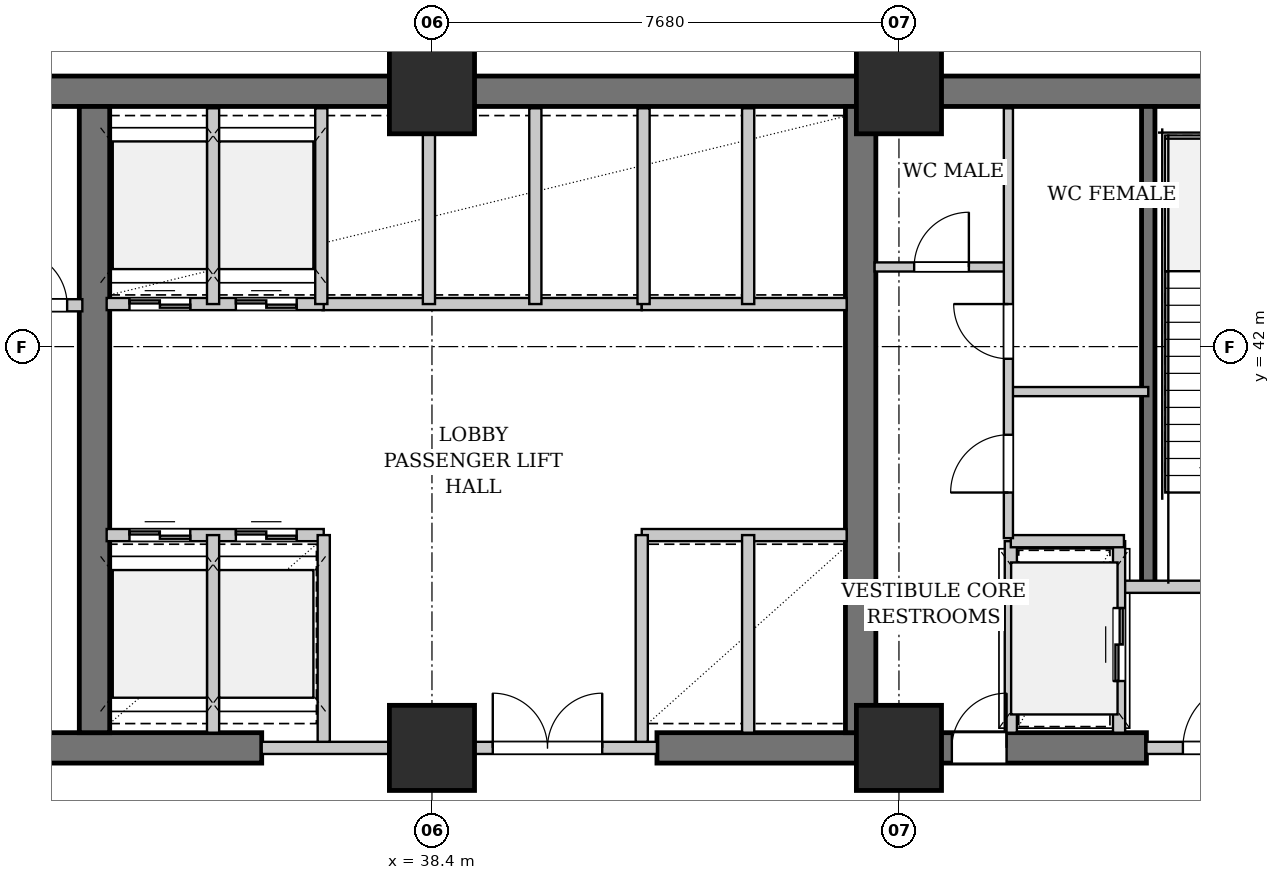
"""IFC4 building model, lengths in metres.
Left out: names, types, materials, properties, quantities, classifications, styles, units other than length and angle.
Written with IfcOpenShell. Run it as: python <this file> out.ifc"""

import sys

from ifc_helpers import new_model, si_unit, direction, frame, frame_2d, origin, origin_2d, place, context, subcontext, project, spatial, rectangle, extrude, element, fill, save


model = new_model("IFC4")
c1 = context("Model", 3, precision=1e-05, world=origin(), true_north=direction((0.0, 1.0)))
c2 = subcontext(c1, "Body", "Model", "MODEL_VIEW")
j1 = project(units=[si_unit("LENGTHUNIT", "METRE"), si_unit("PLANEANGLEUNIT", "RADIAN")], contexts=[c1])
p1 = place(None, origin())
s1 = spatial("IfcSite", under=j1, at=p1, CompositionType="ELEMENT")
p2 = place(p1, origin())
s2 = spatial("IfcBuilding", under=s1, at=p2, CompositionType="ELEMENT")
p3 = place(p2, frame((0.0, 0.0, 20.4)))
s3 = spatial("IfcBuildingStorey", under=s2, at=p3, CompositionType="ELEMENT", Elevation=20.4)
p4 = place(p3, frame((22.79, 46.2, 0.0), z_axis=(0.0, 0.0, 1.0), x_axis=(1.0, 0.0, 0.0)))
e1 = element("IfcWall", 1, at=p4, inside=s3, PredefinedType="SHEAR", context=c2, shape_type="SweptSolid", body=[
    extrude(rectangle(XDim=31.22, YDim=0.5, at=frame_2d((15.61, 0.0))), origin(), (0.0, 0.0, 1.0), 4.38),
])
p5 = place(p3, frame((30.72, 35.4, 0.0), z_axis=(0.0, 0.0, 1.0), x_axis=(1.0, 0.0, 0.0)))
e2 = element("IfcWall", 2, at=p5, inside=s3, PredefinedType="SHEAR", context=c2, shape_type="SweptSolid", body=[
    extrude(rectangle(XDim=4.88, YDim=0.5, at=frame_2d((2.44, 0.0))), origin(), (0.0, 0.0, 1.0), 4.38),
])
p6 = place(p3, frame((42.1, 35.4, 0.0), z_axis=(0.0, 0.0, 1.0), x_axis=(1.0, 0.0, 0.0)))
e3 = element("IfcWall", 3, at=p6, inside=s3, PredefinedType="SHEAR", context=c2, shape_type="SweptSolid", body=[
    extrude(rectangle(XDim=8.05, YDim=0.5, at=frame_2d((4.025, 0.0))), origin(), (0.0, 0.0, 1.0), 4.38),
])
p7 = place(p6, frame((4.85, 0.0, 0.0)))
e4 = element("IfcOpeningElement", 4, at=p7, cuts=e3, PredefinedType="OPENING", context=c2, shape_type="SweptSolid", body=[
    extrude(rectangle(XDim=0.9, YDim=2.15, at=frame_2d((0.45, 1.075))), frame((0.0, 0.26, 0.0), z_axis=(0.0, -1.0, 0.0), x_axis=(1.0, 0.0, 0.0)), (0.0, 0.0, 1.0), 0.52),
])
for number, where, z_axis, x_axis in (
    (5, (32.85, 35.65, 0.0), (0.0, 0.0, 1.0), (0.0, 1.0, 0.0)),
    (6, (45.45, 35.65, 0.0), (0.0, 0.0, 1.0), (0.0, 1.0, 0.0)),
):
    element("IfcWall", number, at=place(p3, frame(where, z_axis=z_axis, x_axis=x_axis)), inside=s3, PredefinedType="SHEAR", context=c2, shape_type="SweptSolid", body=[
        extrude(rectangle(XDim=10.3, YDim=0.5, at=frame_2d((5.15, 0.0))), origin(), (0.0, 0.0, 1.0), 4.38),
    ])
p8 = place(p3, frame((50.18, 38.05, 0.0), z_axis=(0.0, 0.0, 1.0), x_axis=(0.0, 1.0, 0.0)))
e7 = element("IfcWall", 7, at=p8, inside=s3, PredefinedType="SHEAR", context=c2, shape_type="SweptSolid", body=[
    extrude(rectangle(XDim=7.9, YDim=0.22, at=frame_2d((3.95, 0.0))), origin(), (0.0, 0.0, 1.0), 4.38),
])
for number, where, z_axis, x_axis in (
    (8, (38.4, 35.4, 0.0), (0.0, 0.0, 1.0), (1.0, 0.0, 0.0)),
    (9, (38.4, 46.2, 0.0), (0.0, 0.0, 1.0), (1.0, 0.0, 0.0)),
    (10, (46.08, 35.4, 0.0), (0.0, 0.0, 1.0), (1.0, 0.0, 0.0)),
    (11, (46.08, 46.2, 0.0), (0.0, 0.0, 1.0), (1.0, 0.0, 0.0)),
):
    element("IfcColumn", number, at=place(p3, frame(where, z_axis=z_axis, x_axis=x_axis)), inside=s3, PredefinedType="COLUMN", context=c2, shape_type="SweptSolid", body=[
        extrude(rectangle(XDim=1.4, YDim=1.4, at=origin_2d()), origin(), (0.0, 0.0, 1.0), 4.8),
    ])
p9 = place(p3, frame((27.32, 42.68, 0.0), z_axis=(0.0, 0.0, 1.0), x_axis=(1.0, 0.0, 0.0)))
e12 = element("IfcWall", 12, at=p9, inside=s3, PredefinedType="PARTITIONING", context=c2, shape_type="SweptSolid", body=[
    extrude(rectangle(XDim=5.33, YDim=0.2, at=frame_2d((2.665, 0.0))), origin(), (0.0, 0.0, 1.0), 4.38),
])
p10 = place(p9, frame((4.18, 0.0, 0.0)))
e13 = element("IfcOpeningElement", 13, at=p10, cuts=e12, PredefinedType="OPENING", context=c2, shape_type="SweptSolid", body=[
    extrude(rectangle(XDim=0.9, YDim=2.15, at=frame_2d((0.45, 1.075))), frame((0.0, 0.11, 0.0), z_axis=(0.0, -1.0, 0.0), x_axis=(1.0, 0.0, 0.0)), (0.0, 0.0, 1.0), 0.22),
])
p11 = place(p3, frame((35.6, 35.4, 0.0), z_axis=(0.0, 0.0, 1.0), x_axis=(1.0, 0.0, 0.0)))
e14 = element("IfcWall", 14, at=p11, inside=s3, PredefinedType="PARTITIONING", context=c2, shape_type="SweptSolid", body=[
    extrude(rectangle(XDim=6.5, YDim=0.2, at=frame_2d((3.25, 0.0))), origin(), (0.0, 0.0, 1.0), 3.575),
])
p12 = place(p11, frame((3.8, 0.0, 0.0)))
e15 = element("IfcOpeningElement", 15, at=p12, cuts=e14, PredefinedType="OPENING", context=c2, shape_type="SweptSolid", body=[
    extrude(rectangle(XDim=1.8, YDim=2.3, at=frame_2d((0.9, 1.15))), frame((0.0, 0.11, 0.0), z_axis=(0.0, -1.0, 0.0), x_axis=(1.0, 0.0, 0.0)), (0.0, 0.0, 1.0), 0.22),
])
p13 = place(p3, frame((36.6, 42.7, 0.0), z_axis=(0.0, 0.0, 1.0), x_axis=(1.0, 0.0, 0.0)))
e16 = element("IfcWall", 16, at=p13, inside=s3, PredefinedType="PARTITIONING", context=c2, shape_type="SweptSolid", body=[
    extrude(rectangle(XDim=5.25, YDim=0.2, at=frame_2d((2.625, 0.0))), origin(), (0.0, 0.0, 1.0), 4.38),
])
p14 = place(p3, frame((38.35, 42.7, 0.0), z_axis=(0.0, 0.0, 1.0), x_axis=(0.0, 1.0, 0.0)))
e17 = element("IfcWall", 17, at=p14, inside=s3, PredefinedType="PARTITIONING", context=c2, shape_type="SweptSolid", body=[
    extrude(rectangle(XDim=3.22, YDim=0.2, at=frame_2d((1.61, 0.0))), origin(), (0.0, 0.0, 1.0), 3.575),
])
p15 = place(p3, frame((40.1, 42.7, 0.0), z_axis=(0.0, 0.0, 1.0), x_axis=(0.0, 1.0, 0.0)))
e18 = element("IfcWall", 18, at=p15, inside=s3, PredefinedType="PARTITIONING", context=c2, shape_type="SweptSolid", body=[
    extrude(rectangle(XDim=3.22, YDim=0.2, at=frame_2d((1.61, 0.0))), origin(), (0.0, 0.0, 1.0), 4.38),
])
p16 = place(p3, frame((33.05, 38.9, 0.0), z_axis=(0.0, 0.0, 1.0), x_axis=(1.0, 0.0, 0.0)))
e19 = element("IfcWall", 19, at=p16, inside=s3, PredefinedType="PARTITIONING", context=c2, shape_type="SweptSolid", body=[
    extrude(rectangle(XDim=3.57, YDim=0.2, at=frame_2d((1.785, 0.0))), origin(), (0.0, 0.0, 1.0), 4.38),
])
p17 = place(p16, frame((0.375, 0.0, 0.0)))
e20 = element("IfcOpeningElement", 20, at=p17, cuts=e19, PredefinedType="OPENING", context=c2, shape_type="SweptSolid", body=[
    extrude(rectangle(XDim=1.0, YDim=2.2, at=frame_2d((0.5, 1.1))), frame((0.0, 0.11, 0.0), z_axis=(0.0, -1.0, 0.0), x_axis=(1.0, 0.0, 0.0)), (0.0, 0.0, 1.0), 0.22),
])
p18 = place(p16, frame((2.125, 0.0, 0.0)))
e21 = element("IfcOpeningElement", 21, at=p18, cuts=e19, PredefinedType="OPENING", context=c2, shape_type="SweptSolid", body=[
    extrude(rectangle(XDim=1.0, YDim=2.2, at=frame_2d((0.5, 1.1))), frame((0.0, 0.11, 0.0), z_axis=(0.0, -1.0, 0.0), x_axis=(1.0, 0.0, 0.0)), (0.0, 0.0, 1.0), 0.22),
])
p19 = place(p3, frame((33.05, 42.7, 0.0), z_axis=(0.0, 0.0, 1.0), x_axis=(1.0, 0.0, 0.0)))
e22 = element("IfcWall", 22, at=p19, inside=s3, PredefinedType="PARTITIONING", context=c2, shape_type="SweptSolid", body=[
    extrude(rectangle(XDim=3.57, YDim=0.2, at=frame_2d((1.785, 0.0))), origin(), (0.0, 0.0, 1.0), 4.38),
])
p20 = place(p19, frame((0.375, 0.0, 0.0)))
e23 = element("IfcOpeningElement", 23, at=p20, cuts=e22, PredefinedType="OPENING", context=c2, shape_type="SweptSolid", body=[
    extrude(rectangle(XDim=1.0, YDim=2.2, at=frame_2d((0.5, 1.1))), frame((0.0, 0.11, 0.0), z_axis=(0.0, -1.0, 0.0), x_axis=(1.0, 0.0, 0.0)), (0.0, 0.0, 1.0), 0.22),
])
p21 = place(p19, frame((2.125, 0.0, 0.0)))
e24 = element("IfcOpeningElement", 24, at=p21, cuts=e22, PredefinedType="OPENING", context=c2, shape_type="SweptSolid", body=[
    extrude(rectangle(XDim=1.0, YDim=2.2, at=frame_2d((0.5, 1.1))), frame((0.0, 0.11, 0.0), z_axis=(0.0, -1.0, 0.0), x_axis=(1.0, 0.0, 0.0)), (0.0, 0.0, 1.0), 0.22),
])
p22 = place(p3, frame((34.8, 35.65, 0.0), z_axis=(0.0, 0.0, 1.0), x_axis=(0.0, 1.0, 0.0)))
e25 = element("IfcWall", 25, at=p22, inside=s3, PredefinedType="PARTITIONING", context=c2, shape_type="SweptSolid", body=[
    extrude(rectangle(XDim=3.25, YDim=0.2, at=frame_2d((1.625, 0.0))), origin(), (0.0, 0.0, 1.0), 4.38),
])
p23 = place(p3, frame((34.8, 42.7, 0.0), z_axis=(0.0, 0.0, 1.0), x_axis=(0.0, 1.0, 0.0)))
e26 = element("IfcWall", 26, at=p23, inside=s3, PredefinedType="PARTITIONING", context=c2, shape_type="SweptSolid", body=[
    extrude(rectangle(XDim=3.22, YDim=0.2, at=frame_2d((1.61, 0.0))), origin(), (0.0, 0.0, 1.0), 4.38),
])
p24 = place(p3, frame((36.62, 35.5, 0.0), z_axis=(0.0, 0.0, 1.0), x_axis=(0.0, 1.0, 0.0)))
e27 = element("IfcWall", 27, at=p24, inside=s3, PredefinedType="PARTITIONING", context=c2, shape_type="SweptSolid", body=[
    extrude(rectangle(XDim=3.4, YDim=0.2, at=frame_2d((1.7, 0.0))), origin(), (0.0, 0.0, 1.0), 4.38),
])
p25 = place(p3, frame((36.58, 42.7, 0.0), z_axis=(0.0, 0.0, 1.0), x_axis=(0.0, 1.0, 0.0)))
e28 = element("IfcWall", 28, at=p25, inside=s3, PredefinedType="PARTITIONING", context=c2, shape_type="SweptSolid", body=[
    extrude(rectangle(XDim=3.22, YDim=0.2, at=frame_2d((1.61, 0.0))), origin(), (0.0, 0.0, 1.0), 4.38),
])
for number, where, z_axis, x_axis in (
    (29, (41.85, 38.9, 0.0), (0.0, 0.0, 1.0), (1.0, 0.0, 0.0)),
    (30, (41.85, 42.7, 0.0), (0.0, 0.0, 1.0), (1.0, 0.0, 0.0)),
):
    element("IfcWall", number, at=place(p3, frame(where, z_axis=z_axis, x_axis=x_axis)), inside=s3, PredefinedType="PARTITIONING", context=c2, shape_type="SweptSolid", body=[
        extrude(rectangle(XDim=3.37, YDim=0.2, at=frame_2d((1.685, 0.0))), origin(), (0.0, 0.0, 1.0), 4.38),
    ])
p26 = place(p3, frame((43.6, 35.65, 0.0), z_axis=(0.0, 0.0, 1.0), x_axis=(0.0, 1.0, 0.0)))
e31 = element("IfcWall", 31, at=p26, inside=s3, PredefinedType="PARTITIONING", context=c2, shape_type="SweptSolid", body=[
    extrude(rectangle(XDim=3.25, YDim=0.2, at=frame_2d((1.625, 0.0))), origin(), (0.0, 0.0, 1.0), 4.38),
])
p27 = place(p3, frame((43.6, 42.7, 0.0), z_axis=(0.0, 0.0, 1.0), x_axis=(0.0, 1.0, 0.0)))
e32 = element("IfcWall", 32, at=p27, inside=s3, PredefinedType="PARTITIONING", context=c2, shape_type="SweptSolid", body=[
    extrude(rectangle(XDim=3.22, YDim=0.2, at=frame_2d((1.61, 0.0))), origin(), (0.0, 0.0, 1.0), 4.38),
])
p28 = place(p3, frame((41.85, 35.5, 0.0), z_axis=(0.0, 0.0, 1.0), x_axis=(0.0, 1.0, 0.0)))
e33 = element("IfcWall", 33, at=p28, inside=s3, PredefinedType="PARTITIONING", context=c2, shape_type="SweptSolid", body=[
    extrude(rectangle(XDim=3.4, YDim=0.2, at=frame_2d((1.7, 0.0))), origin(), (0.0, 0.0, 1.0), 4.38),
])
p29 = place(p3, frame((41.88, 42.7, 0.0), z_axis=(0.0, 0.0, 1.0), x_axis=(0.0, 1.0, 0.0)))
e34 = element("IfcWall", 34, at=p29, inside=s3, PredefinedType="PARTITIONING", context=c2, shape_type="SweptSolid", body=[
    extrude(rectangle(XDim=3.22, YDim=0.2, at=frame_2d((1.61, 0.0))), origin(), (0.0, 0.0, 1.0), 4.38),
])
p30 = place(p3, frame((49.78, 38.05, 0.0), z_axis=(0.0, 0.0, 1.0), x_axis=(1.0, 0.0, 0.0)))
e35 = element("IfcWall", 35, at=p30, inside=s3, PredefinedType="PARTITIONING", context=c2, shape_type="SweptSolid", body=[
    extrude(rectangle(XDim=3.72, YDim=0.2, at=frame_2d((1.86, 0.0))), origin(), (0.0, 0.0, 1.0), 4.38),
])
p31 = place(p30, frame((1.436, 0.0, 0.0)))
e36 = element("IfcOpeningElement", 36, at=p31, cuts=e35, PredefinedType="OPENING", context=c2, shape_type="SweptSolid", body=[
    extrude(rectangle(XDim=1.1, YDim=2.15, at=frame_2d((0.55, 1.075))), frame((0.0, 0.11, 0.0), z_axis=(0.0, -1.0, 0.0), x_axis=(1.0, 0.0, 0.0)), (0.0, 0.0, 1.0), 0.22),
])
p32 = place(p3, frame((50.15, 35.4, 0.0), z_axis=(0.0, 0.0, 1.0), x_axis=(1.0, 0.0, 0.0)))
e37 = element("IfcWall", 37, at=p32, inside=s3, PredefinedType="PARTITIONING", context=c2, shape_type="SweptSolid", body=[
    extrude(rectangle(XDim=2.3, YDim=0.2, at=frame_2d((1.15, 0.0))), origin(), (0.0, 0.0, 1.0), 3.575),
])
p33 = place(p32, frame((0.6, 0.0, 0.0)))
e38 = element("IfcOpeningElement", 38, at=p33, cuts=e37, PredefinedType="OPENING", context=c2, shape_type="SweptSolid", body=[
    extrude(rectangle(XDim=1.1, YDim=2.15, at=frame_2d((0.55, 1.075))), frame((0.0, 0.11, 0.0), z_axis=(0.0, -1.0, 0.0), x_axis=(1.0, 0.0, 0.0)), (0.0, 0.0, 1.0), 0.22),
])
p34 = place(p3, frame((49.7, 35.65, 0.0), z_axis=(0.0, 0.0, 1.0), x_axis=(0.0, 1.0, 0.0)))
e39 = element("IfcWall", 39, at=p34, inside=s3, PredefinedType="PARTITIONING", context=c2, shape_type="SweptSolid", body=[
    extrude(rectangle(XDim=3.15, YDim=0.2, at=frame_2d((1.575, 0.0))), origin(), (0.0, 0.0, 1.0), 4.38),
])
p35 = place(p34, frame((0.85, 0.0, 0.0)))
e40 = element("IfcOpeningElement", 40, at=p35, cuts=e39, PredefinedType="OPENING", context=c2, shape_type="SweptSolid", body=[
    extrude(rectangle(XDim=1.2, YDim=2.2, at=frame_2d((0.6, 1.1))), frame((0.0, 0.11, 0.0), z_axis=(0.0, -1.0, 0.0), x_axis=(1.0, 0.0, 0.0)), (0.0, 0.0, 1.0), 0.22),
])
p36 = place(p3, frame((47.92, 35.65, 0.0), z_axis=(0.0, 0.0, 1.0), x_axis=(0.0, 1.0, 0.0)))
e41 = element("IfcWall", 41, at=p36, inside=s3, PredefinedType="PARTITIONING", context=c2, shape_type="SweptSolid", body=[
    extrude(rectangle(XDim=3.15, YDim=0.2, at=frame_2d((1.575, 0.0))), origin(), (0.0, 0.0, 1.0), 4.38),
])
p37 = place(p3, frame((47.92, 38.8, 0.0), z_axis=(0.0, 0.0, 1.0), x_axis=(1.0, 0.0, 0.0)))
e42 = element("IfcWall", 42, at=p37, inside=s3, PredefinedType="PARTITIONING", context=c2, shape_type="SweptSolid", body=[
    extrude(rectangle(XDim=1.86, YDim=0.2, at=frame_2d((0.93, 0.0))), origin(), (0.0, 0.0, 1.0), 4.38),
])
p38 = place(p3, frame((45.68, 43.31, 0.0), z_axis=(0.0, 0.0, 1.0), x_axis=(1.0, 0.0, 0.0)))
e43 = element("IfcWall", 43, at=p38, inside=s3, PredefinedType="PARTITIONING", context=c2, shape_type="SweptSolid", body=[
    extrude(rectangle(XDim=2.2, YDim=0.15, at=frame_2d((1.1, 0.0))), origin(), (0.0, 0.0, 1.0), 4.38),
])
p39 = place(p38, frame((0.65, 0.0, 0.0)))
e44 = element("IfcOpeningElement", 44, at=p39, cuts=e43, PredefinedType="OPENING", context=c2, shape_type="SweptSolid", body=[
    extrude(rectangle(XDim=0.9, YDim=2.15, at=frame_2d((0.45, 1.075))), frame((0.0, 0.085, 0.0), z_axis=(0.0, -1.0, 0.0), x_axis=(1.0, 0.0, 0.0)), (0.0, 0.0, 1.0), 0.17),
])
p40 = place(p3, frame((47.88, 41.26, 0.0), z_axis=(0.0, 0.0, 1.0), x_axis=(1.0, 0.0, 0.0)))
e45 = element("IfcWall", 45, at=p40, inside=s3, PredefinedType="PARTITIONING", context=c2, shape_type="SweptSolid", body=[
    extrude(rectangle(XDim=2.3, YDim=0.15, at=frame_2d((1.15, 0.0))), origin(), (0.0, 0.0, 1.0), 4.38),
])
p41 = place(p3, frame((47.88, 38.85, 0.0), z_axis=(0.0, 0.0, 1.0), x_axis=(0.0, 1.0, 0.0)))
e46 = element("IfcWall", 46, at=p41, inside=s3, PredefinedType="PARTITIONING", context=c2, shape_type="SweptSolid", body=[
    extrude(rectangle(XDim=7.07, YDim=0.15, at=frame_2d((3.535, 0.0))), origin(), (0.0, 0.0, 1.0), 4.38),
])
p42 = place(p41, frame((0.75, 0.0, 0.0)))
e47 = element("IfcOpeningElement", 47, at=p42, cuts=e46, PredefinedType="OPENING", context=c2, shape_type="SweptSolid", body=[
    extrude(rectangle(XDim=0.95, YDim=2.15, at=frame_2d((0.475, 1.075))), frame((0.0, 0.085, 0.0), z_axis=(0.0, -1.0, 0.0), x_axis=(1.0, 0.0, 0.0)), (0.0, 0.0, 1.0), 0.17),
])
p43 = place(p41, frame((2.95, 0.0, 0.0)))
e48 = element("IfcOpeningElement", 48, at=p43, cuts=e46, PredefinedType="OPENING", context=c2, shape_type="SweptSolid", body=[
    extrude(rectangle(XDim=0.9, YDim=2.15, at=frame_2d((0.45, 1.075))), frame((0.0, 0.085, 0.0), z_axis=(0.0, -1.0, 0.0), x_axis=(1.0, 0.0, 0.0)), (0.0, 0.0, 1.0), 0.17),
])
p44 = place(p10, origin())
e49 = element("IfcDoor", 49, at=p44, inside=s3, OperationType="SINGLE_SWING_LEFT", PredefinedType="DOOR", context=c2, shape_type="SweptSolid", body=[
    extrude(rectangle(XDim=0.9, YDim=2.15, at=frame_2d((0.45, 1.075))), frame((0.0, 0.025, 0.0), z_axis=(0.0, -1.0, 0.0), x_axis=(1.0, 0.0, 0.0)), (0.0, 0.0, 1.0), 0.05),
])
fill(e13, e49)
p45 = place(p12, origin())
e50 = element("IfcDoor", 50, at=p45, inside=s3, OperationType="DOUBLE_DOOR_SINGLE_SWING", PredefinedType="DOOR", context=c2, shape_type="SweptSolid", body=[
    extrude(rectangle(XDim=1.8, YDim=2.3, at=frame_2d((0.9, 1.15))), frame((0.0, 0.025, 0.0), z_axis=(0.0, -1.0, 0.0), x_axis=(1.0, 0.0, 0.0)), (0.0, 0.0, 1.0), 0.05),
])
fill(e15, e50)
p46 = place(p17, origin())
e51 = element("IfcDoor", 51, at=p46, inside=s3, OperationType="DOUBLE_DOOR_SLIDING", PredefinedType="DOOR", context=c2, shape_type="SweptSolid", body=[
    extrude(rectangle(XDim=1.0, YDim=2.2, at=frame_2d((0.5, 1.1))), frame((0.0, 0.025, 0.0), z_axis=(0.0, -1.0, 0.0), x_axis=(1.0, 0.0, 0.0)), (0.0, 0.0, 1.0), 0.05),
])
fill(e20, e51)
p47 = place(p18, origin())
e52 = element("IfcDoor", 52, at=p47, inside=s3, OperationType="DOUBLE_DOOR_SLIDING", PredefinedType="DOOR", context=c2, shape_type="SweptSolid", body=[
    extrude(rectangle(XDim=1.0, YDim=2.2, at=frame_2d((0.5, 1.1))), frame((0.0, 0.025, 0.0), z_axis=(0.0, -1.0, 0.0), x_axis=(1.0, 0.0, 0.0)), (0.0, 0.0, 1.0), 0.05),
])
fill(e21, e52)
p48 = place(p20, origin())
e53 = element("IfcDoor", 53, at=p48, inside=s3, OperationType="DOUBLE_DOOR_SLIDING", PredefinedType="DOOR", context=c2, shape_type="SweptSolid", body=[
    extrude(rectangle(XDim=1.0, YDim=2.2, at=frame_2d((0.5, 1.1))), frame((0.0, 0.025, 0.0), z_axis=(0.0, -1.0, 0.0), x_axis=(1.0, 0.0, 0.0)), (0.0, 0.0, 1.0), 0.05),
])
fill(e23, e53)
p49 = place(p21, origin())
e54 = element("IfcDoor", 54, at=p49, inside=s3, OperationType="DOUBLE_DOOR_SLIDING", PredefinedType="DOOR", context=c2, shape_type="SweptSolid", body=[
    extrude(rectangle(XDim=1.0, YDim=2.2, at=frame_2d((0.5, 1.1))), frame((0.0, 0.025, 0.0), z_axis=(0.0, -1.0, 0.0), x_axis=(1.0, 0.0, 0.0)), (0.0, 0.0, 1.0), 0.05),
])
fill(e24, e54)
p50 = place(p33, origin())
e55 = element("IfcDoor", 55, at=p50, inside=s3, OperationType="SINGLE_SWING_RIGHT", PredefinedType="DOOR", context=c2, shape_type="SweptSolid", body=[
    extrude(rectangle(XDim=1.1, YDim=2.15, at=frame_2d((0.55, 1.075))), frame((0.0, 0.025, 0.0), z_axis=(0.0, -1.0, 0.0), x_axis=(1.0, 0.0, 0.0)), (0.0, 0.0, 1.0), 0.05),
])
fill(e38, e55)
p51 = place(p35, origin())
e56 = element("IfcDoor", 56, at=p51, inside=s3, OperationType="DOUBLE_DOOR_SLIDING", PredefinedType="DOOR", context=c2, shape_type="SweptSolid", body=[
    extrude(rectangle(XDim=1.2, YDim=2.2, at=frame_2d((0.6, 1.1))), frame((0.0, 0.025, 0.0), z_axis=(0.0, -1.0, 0.0), x_axis=(1.0, 0.0, 0.0)), (0.0, 0.0, 1.0), 0.05),
])
fill(e40, e56)
p52 = place(p39, origin())
e57 = element("IfcDoor", 57, at=p52, inside=s3, OperationType="SINGLE_SWING_RIGHT", PredefinedType="DOOR", context=c2, shape_type="SweptSolid", body=[
    extrude(rectangle(XDim=0.9, YDim=2.15, at=frame_2d((0.45, 1.075))), frame((0.0, 0.025, 0.0), z_axis=(0.0, -1.0, 0.0), x_axis=(1.0, 0.0, 0.0)), (0.0, 0.0, 1.0), 0.05),
])
fill(e44, e57)
p53 = place(p42, origin())
e58 = element("IfcDoor", 58, at=p53, inside=s3, OperationType="SINGLE_SWING_LEFT", PredefinedType="DOOR", context=c2, shape_type="SweptSolid", body=[
    extrude(rectangle(XDim=0.95, YDim=2.15, at=frame_2d((0.475, 1.075))), frame((0.0, 0.025, 0.0), z_axis=(0.0, -1.0, 0.0), x_axis=(1.0, 0.0, 0.0)), (0.0, 0.0, 1.0), 0.05),
])
fill(e47, e58)
p54 = place(p43, origin())
e59 = element("IfcDoor", 59, at=p54, inside=s3, OperationType="SINGLE_SWING_RIGHT", PredefinedType="DOOR", context=c2, shape_type="SweptSolid", body=[
    extrude(rectangle(XDim=0.9, YDim=2.15, at=frame_2d((0.45, 1.075))), frame((0.0, 0.025, 0.0), z_axis=(0.0, -1.0, 0.0), x_axis=(1.0, 0.0, 0.0)), (0.0, 0.0, 1.0), 0.05),
])
fill(e48, e59)
p55 = place(p7, origin())
e60 = element("IfcDoor", 60, at=p55, inside=s3, OperationType="SINGLE_SWING_RIGHT", PredefinedType="DOOR", context=c2, shape_type="SweptSolid", body=[
    extrude(rectangle(XDim=0.9, YDim=2.15, at=frame_2d((0.45, 1.075))), frame((0.0, 0.025, 0.0), z_axis=(0.0, -1.0, 0.0), x_axis=(1.0, 0.0, 0.0)), (0.0, 0.0, 1.0), 0.05),
])
fill(e4, e60)
save(model, sys.argv[1])
